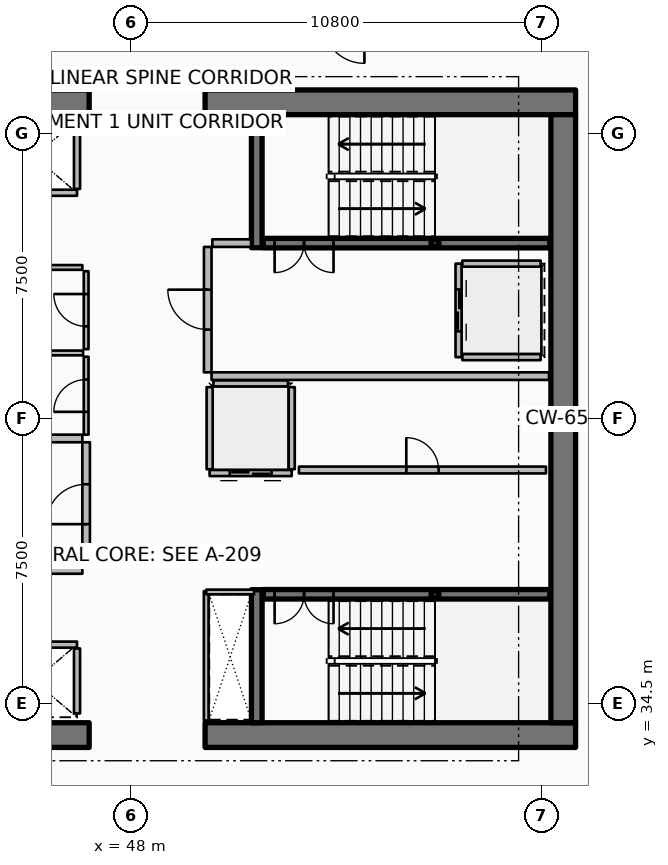
"""IFC4 building model, lengths in metres.
Left out: names, types, materials, properties, quantities, classifications, styles, units other than length and angle.
Written with IfcOpenShell. Run it as: python <this file> out.ifc"""

import sys

from ifc_helpers import new_model, si_unit, direction, frame, frame_2d, origin, origin_2d, place, context, subcontext, project, spatial, rectangle, hollow_rectangle, extrude, element, fill, save


model = new_model("IFC4")
c1 = context("Model", 3, precision=1e-05, world=origin(), true_north=direction((0.0, 1.0)))
c2 = subcontext(c1, "Body", "Model", "MODEL_VIEW")
j1 = project(units=[si_unit("LENGTHUNIT", "METRE"), si_unit("PLANEANGLEUNIT", "RADIAN")], contexts=[c1])
p1 = place(None, origin())
s1 = spatial("IfcSite", under=j1, at=p1, CompositionType="ELEMENT")
p2 = place(p1, origin())
s2 = spatial("IfcBuilding", under=s1, at=p2, CompositionType="ELEMENT")
p3 = place(p2, frame((0.0, 0.0, 176.55)))
s3 = spatial("IfcBuildingStorey", under=s2, at=p3, CompositionType="ELEMENT", Elevation=176.55)
for number, where, z_axis, x_axis in (
    (1, (37.15, 33.675, 0.0), (0.0, 0.0, 1.0), (1.0, 0.0, 0.0)),
    (2, (49.95, 33.675, 0.0), (0.0, 0.0, 1.0), (1.0, 0.0, 0.0)),
    (3, (37.15, 50.325, 0.0), (0.0, 0.0, 1.0), (1.0, 0.0, 0.0)),
    (4, (49.95, 50.325, 0.0), (0.0, 0.0, 1.0), (1.0, 0.0, 0.0)),
):
    element("IfcWall", number, at=place(p3, frame(where, z_axis=z_axis, x_axis=x_axis)), inside=s3, PredefinedType="SHEAR", context=c2, shape_type="SweptSolid", body=[
        extrude(rectangle(XDim=9.75, YDim=0.65, at=frame_2d((4.875, 0.0))), origin(), (0.0, 0.0, 1.0), 3.75),
    ])
p4 = place(p3, frame((59.375, 34.0, 0.0), z_axis=(0.0, 0.0, 1.0), x_axis=(0.0, 1.0, 0.0)))
e5 = element("IfcWall", 5, at=p4, inside=s3, PredefinedType="SHEAR", context=c2, shape_type="SweptSolid", body=[
    extrude(rectangle(XDim=16.0, YDim=0.65, at=frame_2d((8.0, 0.0))), origin(), (0.0, 0.0, 1.0), 3.75),
])
for number, where, z_axis, x_axis in (
    (6, (51.31, 46.5, 0.0), (0.0, 0.0, 1.0), (0.0, 1.0, 0.0)),
    (7, (51.31, 34.0, 0.0), (0.0, 0.0, 1.0), (0.0, 1.0, 0.0)),
):
    element("IfcWall", number, at=place(p3, frame(where, z_axis=z_axis, x_axis=x_axis)), inside=s3, PredefinedType="SHEAR", context=c2, shape_type="SweptSolid", body=[
        extrude(rectangle(XDim=3.5, YDim=0.28, at=frame_2d((1.75, 0.0))), origin(), (0.0, 0.0, 1.0), 3.75),
    ])
for number, where, z_axis, x_axis in (
    (8, (56.0, 46.62, 0.0), (0.0, 0.0, 1.0), (1.0, 0.0, 0.0)),
    (9, (56.0, 37.38, 0.0), (0.0, 0.0, 1.0), (1.0, 0.0, 0.0)),
):
    element("IfcColumn", number, at=place(p3, frame(where, z_axis=z_axis, x_axis=x_axis)), inside=s3, PredefinedType="COLUMN", context=c2, shape_type="SweptSolid", body=[
        extrude(hollow_rectangle(XDim=0.2, YDim=0.2, WallThickness=0.01, InnerFilletRadius=0.01, OuterFilletRadius=0.02, at=origin_2d()), origin(), (0.0, 0.0, 1.0), 1.67),
    ])
p5 = place(p3, frame((51.48, 46.62, 0.0), z_axis=(0.0, 0.0, 1.0), x_axis=(1.0, 0.0, 0.0)))
e10 = element("IfcWall", 10, at=p5, inside=s3, PredefinedType="SOLIDWALL", context=c2, shape_type="SweptSolid", body=[
    extrude(rectangle(XDim=7.54, YDim=0.25, at=frame_2d((3.77, 0.0))), origin(), (0.0, 0.0, 1.0), 3.5),
])
p6 = place(p5, frame((0.3, 0.0, 0.0)))
e11 = element("IfcOpeningElement", 11, at=p6, cuts=e10, PredefinedType="OPENING", context=c2, shape_type="SweptSolid", body=[
    extrude(rectangle(XDim=1.55, YDim=2.15, at=frame_2d((0.775, 1.075))), frame((0.0, 0.135, 0.0), z_axis=(0.0, -1.0, 0.0), x_axis=(1.0, 0.0, 0.0)), (0.0, 0.0, 1.0), 0.27),
])
p7 = place(p3, frame((51.48, 37.38, 0.0), z_axis=(0.0, 0.0, 1.0), x_axis=(1.0, 0.0, 0.0)))
e12 = element("IfcWall", 12, at=p7, inside=s3, PredefinedType="SOLIDWALL", context=c2, shape_type="SweptSolid", body=[
    extrude(rectangle(XDim=7.54, YDim=0.25, at=frame_2d((3.77, 0.0))), origin(), (0.0, 0.0, 1.0), 3.5),
])
p8 = place(p7, frame((0.3, 0.0, 0.0)))
e13 = element("IfcOpeningElement", 13, at=p8, cuts=e12, PredefinedType="OPENING", context=c2, shape_type="SweptSolid", body=[
    extrude(rectangle(XDim=1.55, YDim=2.15, at=frame_2d((0.775, 1.075))), frame((0.0, 0.135, 0.0), z_axis=(0.0, -1.0, 0.0), x_axis=(1.0, 0.0, 0.0)), (0.0, 0.0, 1.0), 0.27),
])
p9 = place(p3, frame((46.58, 47.945, 0.0), z_axis=(0.0, 0.0, 1.0), x_axis=(-1.0, 0.0, 0.0)))
e14 = element("IfcWall", 14, at=p9, inside=s3, PredefinedType="PARTITIONING", context=c2, shape_type="SweptSolid", body=[
    extrude(rectangle(XDim=2.26, YDim=0.16, at=frame_2d((1.13, 0.0))), origin(), (0.0, 0.0, 1.0), 3.5),
])
p10 = place(p3, frame((46.58, 48.045, 0.0), z_axis=(0.0, 0.0, 1.0), x_axis=(0.0, 1.0, 0.0)))
e15 = element("IfcWall", 15, at=p10, inside=s3, PredefinedType="PARTITIONING", context=c2, shape_type="SweptSolid", body=[
    extrude(rectangle(XDim=1.71, YDim=0.16, at=frame_2d((0.855, 0.0))), origin(), (0.0, 0.0, 1.0), 3.5),
])
p11 = place(p3, frame((44.32, 36.055, 0.0), z_axis=(0.0, 0.0, 1.0), x_axis=(1.0, 0.0, 0.0)))
e16 = element("IfcWall", 16, at=p11, inside=s3, PredefinedType="PARTITIONING", context=c2, shape_type="SweptSolid", body=[
    extrude(rectangle(XDim=2.26, YDim=0.16, at=frame_2d((1.13, 0.0))), origin(), (0.0, 0.0, 1.0), 3.5),
])
p12 = place(p3, frame((46.58, 34.245, 0.0), z_axis=(0.0, 0.0, 1.0), x_axis=(0.0, 1.0, 0.0)))
e17 = element("IfcWall", 17, at=p12, inside=s3, PredefinedType="PARTITIONING", context=c2, shape_type="SweptSolid", body=[
    extrude(rectangle(XDim=1.71, YDim=0.16, at=frame_2d((0.855, 0.0))), origin(), (0.0, 0.0, 1.0), 3.5),
])
p13 = place(p3, frame((56.62, 46.08, 0.0), z_axis=(0.0, 0.0, 1.0), x_axis=(0.0, -1.0, 0.0)))
e18 = element("IfcWall", 18, at=p13, inside=s3, PredefinedType="PARTITIONING", context=c2, shape_type="SweptSolid", body=[
    extrude(rectangle(XDim=2.46, YDim=0.16, at=frame_2d((1.23, 0.0))), origin(), (0.0, 0.0, 1.0), 3.5),
])
p14 = place(p13, frame((0.68, 0.0, 0.0)))
e19 = element("IfcOpeningElement", 19, at=p14, cuts=e18, PredefinedType="OPENING", context=c2, shape_type="SweptSolid", body=[
    extrude(rectangle(XDim=1.1, YDim=2.1, at=frame_2d((0.55, 1.05))), frame((0.0, 0.09, 0.0), z_axis=(0.0, -1.0, 0.0), x_axis=(1.0, 0.0, 0.0)), (0.0, 0.0, 1.0), 0.18),
])
for number, where, z_axis, x_axis in (
    (20, (56.72, 46.08, 0.0), (0.0, 0.0, 1.0), (1.0, 0.0, 0.0)),
    (21, (56.72, 43.62, 0.0), (0.0, 0.0, 1.0), (1.0, 0.0, 0.0)),
):
    element("IfcWall", number, at=place(p3, frame(where, z_axis=z_axis, x_axis=x_axis)), inside=s3, PredefinedType="PARTITIONING", context=c2, shape_type="SweptSolid", body=[
        extrude(rectangle(XDim=2.06, YDim=0.16, at=frame_2d((1.03, 0.0))), origin(), (0.0, 0.0, 1.0), 3.5),
    ])
p15 = place(p3, frame((52.23, 40.57, 0.0), z_axis=(0.0, 0.0, 1.0), x_axis=(-1.0, 0.0, 0.0)))
e22 = element("IfcWall", 22, at=p15, inside=s3, PredefinedType="PARTITIONING", context=c2, shape_type="SweptSolid", body=[
    extrude(rectangle(XDim=2.16, YDim=0.16, at=frame_2d((1.08, 0.0))), origin(), (0.0, 0.0, 1.0), 3.5),
])
p16 = place(p15, frame((0.53, 0.0, 0.0)))
e23 = element("IfcOpeningElement", 23, at=p16, cuts=e22, PredefinedType="OPENING", context=c2, shape_type="SweptSolid", body=[
    extrude(rectangle(XDim=1.1, YDim=2.1, at=frame_2d((0.55, 1.05))), frame((0.0, 0.09, 0.0), z_axis=(0.0, -1.0, 0.0), x_axis=(1.0, 0.0, 0.0)), (0.0, 0.0, 1.0), 0.18),
])
for number, where, z_axis, x_axis in (
    (24, (52.23, 40.67, 0.0), (0.0, 0.0, 1.0), (0.0, 1.0, 0.0)),
    (25, (50.07, 40.67, 0.0), (0.0, 0.0, 1.0), (0.0, 1.0, 0.0)),
):
    element("IfcWall", number, at=place(p3, frame(where, z_axis=z_axis, x_axis=x_axis)), inside=s3, PredefinedType="PARTITIONING", context=c2, shape_type="SweptSolid", body=[
        extrude(rectangle(XDim=2.16, YDim=0.16, at=frame_2d((1.08, 0.0))), origin(), (0.0, 0.0, 1.0), 3.5),
    ])
p17 = place(p3, frame((50.17, 42.93, 0.0), z_axis=(0.0, 0.0, 1.0), x_axis=(1.0, 0.0, 0.0)))
e26 = element("IfcWall", 26, at=p17, inside=s3, PredefinedType="PARTITIONING", context=c2, shape_type="SweptSolid", body=[
    extrude(rectangle(XDim=1.96, YDim=0.16, at=frame_2d((0.98, 0.0))), origin(), (0.0, 0.0, 1.0), 3.5),
])
p18 = place(p3, frame((52.42, 40.65, 0.0), z_axis=(0.0, 0.0, 1.0), x_axis=(1.0, 0.0, 0.0)))
e27 = element("IfcWall", 27, at=p18, inside=s3, PredefinedType="PARTITIONING", context=c2, shape_type="SweptSolid", body=[
    extrude(rectangle(XDim=6.5, YDim=0.18, at=frame_2d((3.25, 0.0))), origin(), (0.0, 0.0, 1.0), 3.5),
])
p19 = place(p18, frame((2.825, 0.0, 0.0)))
e28 = element("IfcOpeningElement", 28, at=p19, cuts=e27, PredefinedType="OPENING", context=c2, shape_type="SweptSolid", body=[
    extrude(rectangle(XDim=0.85, YDim=2.06, at=frame_2d((0.425, 1.03))), frame((0.0, 0.1, 0.0), z_axis=(0.0, -1.0, 0.0), x_axis=(1.0, 0.0, 0.0)), (0.0, 0.0, 1.0), 0.2),
])
p20 = place(p3, frame((41.35, 38.02, 0.0), z_axis=(0.0, 0.0, 1.0), x_axis=(1.0, 0.0, 0.0)))
e29 = element("IfcWall", 29, at=p20, inside=s3, PredefinedType="PARTITIONING", context=c2, shape_type="SweptSolid", body=[
    extrude(rectangle(XDim=5.37, YDim=0.2, at=frame_2d((2.685, 0.0))), origin(), (0.0, 0.0, 1.0), 3.5),
])
p21 = place(p3, frame((43.92, 41.48, 0.0), z_axis=(0.0, 0.0, 1.0), x_axis=(1.0, 0.0, 0.0)))
e30 = element("IfcWall", 30, at=p21, inside=s3, PredefinedType="PARTITIONING", context=c2, shape_type="SweptSolid", body=[
    extrude(rectangle(XDim=2.8, YDim=0.2, at=frame_2d((1.4, 0.0))), origin(), (0.0, 0.0, 1.0), 3.5),
])
p22 = place(p3, frame((46.82, 38.12, 0.0), z_axis=(0.0, 0.0, 1.0), x_axis=(0.0, 1.0, 0.0)))
e31 = element("IfcWall", 31, at=p22, inside=s3, PredefinedType="PARTITIONING", context=c2, shape_type="SweptSolid", body=[
    extrude(rectangle(XDim=3.26, YDim=0.2, at=frame_2d((1.63, 0.0))), origin(), (0.0, 0.0, 1.0), 3.5),
])
p23 = place(p22, frame((1.105, 0.0, 0.0)))
e32 = element("IfcOpeningElement", 32, at=p23, cuts=e31, PredefinedType="OPENING", context=c2, shape_type="SweptSolid", body=[
    extrude(rectangle(XDim=1.05, YDim=2.1, at=frame_2d((0.525, 1.05))), frame((0.0, 0.11, 0.0), z_axis=(0.0, -1.0, 0.0), x_axis=(1.0, 0.0, 0.0)), (0.0, 0.0, 1.0), 0.22),
])
p24 = place(p3, frame((50.12, 43.12, 0.0), z_axis=(0.0, 0.0, 1.0), x_axis=(1.0, 0.0, 0.0)))
e33 = element("IfcWall", 33, at=p24, inside=s3, PredefinedType="PARTITIONING", context=c2, shape_type="SweptSolid", body=[
    extrude(rectangle(XDim=8.88, YDim=0.2, at=frame_2d((4.44, 0.0))), origin(), (0.0, 0.0, 1.0), 3.5),
])
p25 = place(p3, frame((50.14, 46.62, 0.0), z_axis=(0.0, 0.0, 1.0), x_axis=(1.0, 0.0, 0.0)))
e34 = element("IfcWall", 34, at=p25, inside=s3, PredefinedType="PARTITIONING", context=c2, shape_type="SweptSolid", body=[
    extrude(rectangle(XDim=1.02, YDim=0.2, at=frame_2d((0.51, 0.0))), origin(), (0.0, 0.0, 1.0), 3.5),
])
p26 = place(p3, frame((50.02, 43.22, 0.0), z_axis=(0.0, 0.0, 1.0), x_axis=(0.0, 1.0, 0.0)))
e35 = element("IfcWall", 35, at=p26, inside=s3, PredefinedType="PARTITIONING", context=c2, shape_type="SweptSolid", body=[
    extrude(rectangle(XDim=3.3, YDim=0.2, at=frame_2d((1.65, 0.0))), origin(), (0.0, 0.0, 1.0), 3.5),
])
p27 = place(p26, frame((1.125, 0.0, 0.0)))
e36 = element("IfcOpeningElement", 36, at=p27, cuts=e35, PredefinedType="OPENING", context=c2, shape_type="SweptSolid", body=[
    extrude(rectangle(XDim=1.05, YDim=2.1, at=frame_2d((0.525, 1.05))), frame((0.0, 0.11, 0.0), z_axis=(0.0, -1.0, 0.0), x_axis=(1.0, 0.0, 0.0)), (0.0, 0.0, 1.0), 0.22),
])
p28 = place(p3, frame((41.36, 45.98, 0.0), z_axis=(0.0, 0.0, 1.0), x_axis=(1.0, 0.0, 0.0)))
e37 = element("IfcWall", 37, at=p28, inside=s3, PredefinedType="PARTITIONING", context=c2, shape_type="SweptSolid", body=[
    extrude(rectangle(XDim=5.36, YDim=0.125, at=frame_2d((2.68, 0.0))), origin(), (0.0, 0.0, 1.0), 2.94),
])
p29 = place(p3, frame((49.98, 34.06, 0.0), z_axis=(0.0, 0.0, 1.0), x_axis=(0.0, 1.0, 0.0)))
e38 = element("IfcWall", 38, at=p29, inside=s3, PredefinedType="PARTITIONING", context=c2, shape_type="SweptSolid", body=[
    extrude(rectangle(XDim=3.4, YDim=0.125, at=frame_2d((1.7, 0.0))), origin(), (0.0, 0.0, 1.0), 2.94),
])
p30 = place(p3, frame((49.98, 37.44, 0.0), z_axis=(0.0, 0.0, 1.0), x_axis=(1.0, 0.0, 0.0)))
e39 = element("IfcWall", 39, at=p30, inside=s3, PredefinedType="PARTITIONING", context=c2, shape_type="SweptSolid", body=[
    extrude(rectangle(XDim=1.26, YDim=0.125, at=frame_2d((0.63, 0.0))), origin(), (0.0, 0.0, 1.0), 2.94),
])
p31 = place(p3, frame((44.03, 43.73, 0.0), z_axis=(0.0, 0.0, 1.0), x_axis=(1.0, 0.0, 0.0)))
e40 = element("IfcWall", 40, at=p31, inside=s3, PredefinedType="PARTITIONING", context=c2, shape_type="SweptSolid", body=[
    extrude(rectangle(XDim=2.71, YDim=0.125, at=frame_2d((1.355, 0.0))), origin(), (0.0, 0.0, 1.0), 2.94),
])
p32 = place(p3, frame((46.82, 41.58, 0.0), z_axis=(0.0, 0.0, 1.0), x_axis=(0.0, 1.0, 0.0)))
e41 = element("IfcWall", 41, at=p32, inside=s3, PredefinedType="PARTITIONING", context=c2, shape_type="SweptSolid", body=[
    extrude(rectangle(XDim=2.05, YDim=0.125, at=frame_2d((1.025, 0.0))), origin(), (0.0, 0.0, 1.0), 2.94),
])
p33 = place(p32, frame((0.6, 0.0, 0.0)))
e42 = element("IfcOpeningElement", 42, at=p33, cuts=e41, PredefinedType="OPENING", context=c2, shape_type="SweptSolid", body=[
    extrude(rectangle(XDim=0.85, YDim=2.06, at=frame_2d((0.425, 1.03))), frame((0.0, 0.073, 0.0), z_axis=(0.0, -1.0, 0.0), x_axis=(1.0, 0.0, 0.0)), (0.0, 0.0, 1.0), 0.145),
])
p34 = place(p3, frame((46.82, 43.83, 0.0), z_axis=(0.0, 0.0, 1.0), x_axis=(0.0, 1.0, 0.0)))
e43 = element("IfcWall", 43, at=p34, inside=s3, PredefinedType="PARTITIONING", context=c2, shape_type="SweptSolid", body=[
    extrude(rectangle(XDim=2.05, YDim=0.125, at=frame_2d((1.025, 0.0))), origin(), (0.0, 0.0, 1.0), 2.94),
])
p35 = place(p34, frame((0.6, 0.0, 0.0)))
e44 = element("IfcOpeningElement", 44, at=p35, cuts=e43, PredefinedType="OPENING", context=c2, shape_type="SweptSolid", body=[
    extrude(rectangle(XDim=0.85, YDim=2.06, at=frame_2d((0.425, 1.03))), frame((0.0, 0.073, 0.0), z_axis=(0.0, -1.0, 0.0), x_axis=(1.0, 0.0, 0.0)), (0.0, 0.0, 1.0), 0.145),
])
p36 = place(p6, origin())
e45 = element("IfcDoor", 45, at=p36, inside=s3, OperationType="DOUBLE_DOOR_SINGLE_SWING", PredefinedType="DOOR", context=c2, shape_type="SweptSolid", body=[
    extrude(rectangle(XDim=1.55, YDim=2.15, at=frame_2d((0.775, 1.075))), frame((0.0, 0.025, 0.0), z_axis=(0.0, -1.0, 0.0), x_axis=(1.0, 0.0, 0.0)), (0.0, 0.0, 1.0), 0.05),
])
fill(e11, e45)
p37 = place(p8, origin())
e46 = element("IfcDoor", 46, at=p37, inside=s3, OperationType="DOUBLE_DOOR_SINGLE_SWING", PredefinedType="DOOR", context=c2, shape_type="SweptSolid", body=[
    extrude(rectangle(XDim=1.55, YDim=2.15, at=frame_2d((0.775, 1.075))), frame((0.0, 0.025, 0.0), z_axis=(0.0, -1.0, 0.0), x_axis=(1.0, 0.0, 0.0)), (0.0, 0.0, 1.0), 0.05),
])
fill(e13, e46)
p38 = place(p14, origin())
e47 = element("IfcDoor", 47, at=p38, inside=s3, OperationType="DOUBLE_DOOR_SLIDING", PredefinedType="DOOR", context=c2, shape_type="SweptSolid", body=[
    extrude(rectangle(XDim=1.1, YDim=2.1, at=frame_2d((0.55, 1.05))), frame((0.0, 0.025, 0.0), z_axis=(0.0, -1.0, 0.0), x_axis=(1.0, 0.0, 0.0)), (0.0, 0.0, 1.0), 0.05),
])
fill(e19, e47)
p39 = place(p16, origin())
e48 = element("IfcDoor", 48, at=p39, inside=s3, OperationType="DOUBLE_DOOR_SLIDING", PredefinedType="DOOR", context=c2, shape_type="SweptSolid", body=[
    extrude(rectangle(XDim=1.1, YDim=2.1, at=frame_2d((0.55, 1.05))), frame((0.0, 0.025, 0.0), z_axis=(0.0, -1.0, 0.0), x_axis=(1.0, 0.0, 0.0)), (0.0, 0.0, 1.0), 0.05),
])
fill(e23, e48)
p40 = place(p19, origin())
e49 = element("IfcDoor", 49, at=p40, inside=s3, OperationType="SINGLE_SWING_LEFT", PredefinedType="DOOR", context=c2, shape_type="SweptSolid", body=[
    extrude(rectangle(XDim=0.85, YDim=2.06, at=frame_2d((0.425, 1.03))), frame((0.0, 0.025, 0.0), z_axis=(0.0, -1.0, 0.0), x_axis=(1.0, 0.0, 0.0)), (0.0, 0.0, 1.0), 0.05),
])
fill(e28, e49)
p41 = place(p23, origin())
e50 = element("IfcDoor", 50, at=p41, inside=s3, OperationType="SINGLE_SWING_LEFT", PredefinedType="DOOR", context=c2, shape_type="SweptSolid", body=[
    extrude(rectangle(XDim=1.05, YDim=2.1, at=frame_2d((0.525, 1.05))), frame((0.0, 0.025, 0.0), z_axis=(0.0, -1.0, 0.0), x_axis=(1.0, 0.0, 0.0)), (0.0, 0.0, 1.0), 0.05),
])
fill(e32, e50)
p42 = place(p27, origin())
e51 = element("IfcDoor", 51, at=p42, inside=s3, OperationType="SINGLE_SWING_RIGHT", PredefinedType="DOOR", context=c2, shape_type="SweptSolid", body=[
    extrude(rectangle(XDim=1.05, YDim=2.1, at=frame_2d((0.525, 1.05))), frame((0.0, 0.025, 0.0), z_axis=(0.0, -1.0, 0.0), x_axis=(1.0, 0.0, 0.0)), (0.0, 0.0, 1.0), 0.05),
])
fill(e36, e51)
p43 = place(p33, origin())
e52 = element("IfcDoor", 52, at=p43, inside=s3, OperationType="SINGLE_SWING_LEFT", PredefinedType="DOOR", context=c2, shape_type="SweptSolid", body=[
    extrude(rectangle(XDim=0.85, YDim=2.06, at=frame_2d((0.425, 1.03))), frame((0.0, 0.025, 0.0), z_axis=(0.0, -1.0, 0.0), x_axis=(1.0, 0.0, 0.0)), (0.0, 0.0, 1.0), 0.05),
])
fill(e42, e52)
p44 = place(p35, origin())
e53 = element("IfcDoor", 53, at=p44, inside=s3, OperationType="SINGLE_SWING_RIGHT", PredefinedType="DOOR", context=c2, shape_type="SweptSolid", body=[
    extrude(rectangle(XDim=0.85, YDim=2.06, at=frame_2d((0.425, 1.03))), frame((0.0, 0.025, 0.0), z_axis=(0.0, -1.0, 0.0), x_axis=(1.0, 0.0, 0.0)), (0.0, 0.0, 1.0), 0.05),
])
fill(e44, e53)
save(model, sys.argv[1])
